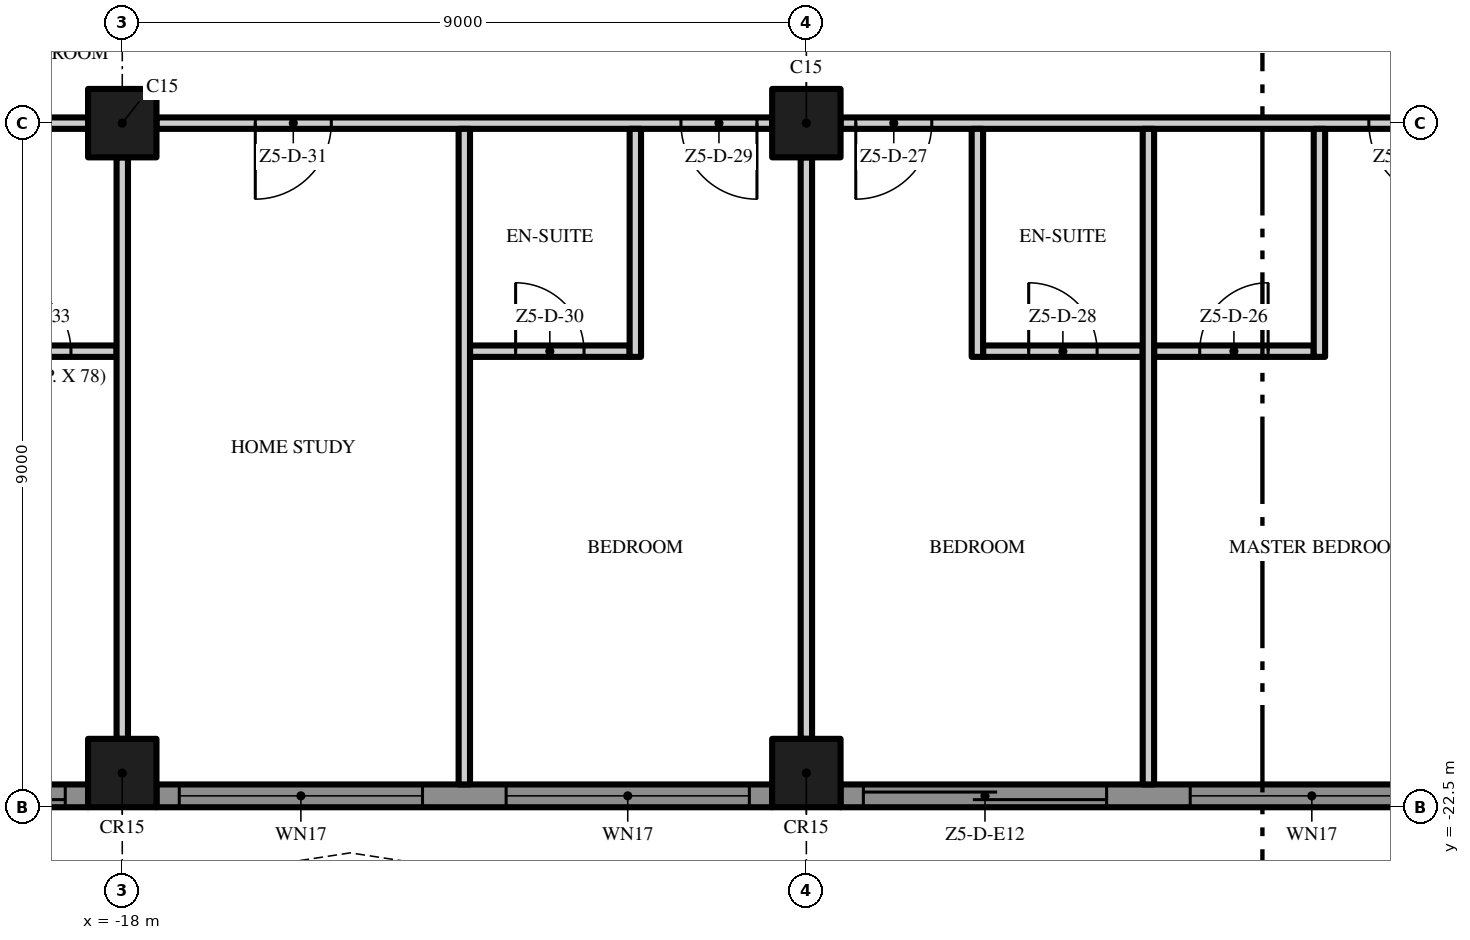
"""IFC4 building model, lengths in metres.
Left out: names, types, materials, properties, quantities, classifications, styles, units other than length and angle.
Written with IfcOpenShell. Run it as: python <this file> out.ifc"""

import sys

from ifc_helpers import new_model, si_unit, direction, frame, frame_2d, origin, origin_2d, place, context, subcontext, project, spatial, polyline, rectangle, outline, extrude, element, fill, save


model = new_model("IFC4")
c1 = context("Model", 3, precision=1e-05, world=origin(), true_north=direction((0.0, 1.0)))
c2 = subcontext(c1, "Body", "Model", "MODEL_VIEW")
j1 = project(units=[si_unit("LENGTHUNIT", "METRE"), si_unit("PLANEANGLEUNIT", "RADIAN")], contexts=[c1])
p1 = place(None, origin())
s1 = spatial("IfcSite", under=j1, at=p1, CompositionType="ELEMENT")
p2 = place(p1, origin())
s2 = spatial("IfcBuilding", under=s1, at=p2, CompositionType="ELEMENT")
p3 = place(p2, frame((0.0, 0.0, 280.6)))
s3 = spatial("IfcBuildingStorey", under=s2, at=p3, CompositionType="ELEMENT", Elevation=280.6)
for number, where, z_axis, x_axis in (
    (1, (-18.0, -13.5, 0.0), (0.0, 0.0, 1.0), (1.0, 0.0, 0.0)),
    (2, (-18.0, -22.05, 0.0), (0.0, 0.0, 1.0), (1.0, 0.0, 0.0)),
    (3, (-9.0, -13.5, 0.0), (0.0, 0.0, 1.0), (1.0, 0.0, 0.0)),
    (4, (-9.0, -22.05, 0.0), (0.0, 0.0, 1.0), (1.0, 0.0, 0.0)),
):
    element("IfcColumn", number, at=place(p3, frame(where, z_axis=z_axis, x_axis=x_axis)), inside=s3, PredefinedType="COLUMN", context=c2, shape_type="SweptSolid", body=[
        extrude(rectangle(XDim=0.9, YDim=0.9, at=origin_2d()), origin(), (0.0, 0.0, 1.0), 3.5),
    ])
p4 = place(p3, frame((-18.45, -22.35, 0.0), z_axis=(0.0, 0.0, 1.0), x_axis=(-1.0, 0.0, 0.0)))
e5 = element("IfcWall", 5, at=p4, inside=s3, PredefinedType="SOLIDWALL", context=c2, shape_type="SweptSolid", body=[
    extrude(rectangle(XDim=3.75, YDim=0.3, at=frame_2d((1.875, 0.0))), origin(), (0.0, 0.0, 1.0), 3.5),
])
p5 = place(p4, frame((0.3, 0.0, 0.0)))
e6 = element("IfcOpeningElement", 6, at=p5, cuts=e5, PredefinedType="OPENING", context=c2, shape_type="SweptSolid", body=[
    extrude(rectangle(XDim=3.15, YDim=2.4, at=frame_2d((1.575, 1.2))), frame((0.0, 0.16, 0.0), z_axis=(0.0, -1.0, 0.0), x_axis=(1.0, 0.0, 0.0)), (0.0, 0.0, 1.0), 0.32),
])
p6 = place(p3, frame((-9.45, -22.35, 0.0), z_axis=(0.0, 0.0, 1.0), x_axis=(-1.0, 0.0, 0.0)))
e7 = element("IfcWall", 7, at=p6, inside=s3, PredefinedType="SOLIDWALL", context=c2, shape_type="SweptSolid", body=[
    extrude(rectangle(XDim=8.1, YDim=0.3, at=frame_2d((4.05, 0.0))), origin(), (0.0, 0.0, 1.0), 3.5),
])
p7 = place(p6, frame((4.6, 0.0, 0.45)))
e8 = element("IfcOpeningElement", 8, at=p7, cuts=e7, PredefinedType="OPENING", context=c2, shape_type="SweptSolid", body=[
    extrude(rectangle(XDim=3.2, YDim=2.65, at=frame_2d((1.6, 1.325))), frame((0.0, 0.16, 0.0), z_axis=(0.0, -1.0, 0.0), x_axis=(1.0, 0.0, 0.0)), (0.0, 0.0, 1.0), 0.32),
])
p8 = place(p6, frame((0.3, 0.0, 0.45)))
e9 = element("IfcOpeningElement", 9, at=p8, cuts=e7, PredefinedType="OPENING", context=c2, shape_type="SweptSolid", body=[
    extrude(rectangle(XDim=3.2, YDim=2.65, at=frame_2d((1.6, 1.325))), frame((0.0, 0.16, 0.0), z_axis=(0.0, -1.0, 0.0), x_axis=(1.0, 0.0, 0.0)), (0.0, 0.0, 1.0), 0.32),
])
p9 = place(p3, frame((-0.45, -22.35, 0.0), z_axis=(0.0, 0.0, 1.0), x_axis=(-1.0, 0.0, 0.0)))
e10 = element("IfcWall", 10, at=p9, inside=s3, PredefinedType="SOLIDWALL", context=c2, shape_type="SweptSolid", body=[
    extrude(rectangle(XDim=8.1, YDim=0.3, at=frame_2d((4.05, 0.0))), origin(), (0.0, 0.0, 1.0), 3.5),
])
p10 = place(p9, frame((4.6, 0.0, 0.0)))
e11 = element("IfcOpeningElement", 11, at=p10, cuts=e10, PredefinedType="OPENING", context=c2, shape_type="SweptSolid", body=[
    extrude(rectangle(XDim=3.2, YDim=2.4, at=frame_2d((1.6, 1.2))), frame((0.0, 0.16, 0.0), z_axis=(0.0, -1.0, 0.0), x_axis=(1.0, 0.0, 0.0)), (0.0, 0.0, 1.0), 0.32),
])
p11 = place(p9, frame((0.3, 0.0, 0.45)))
e12 = element("IfcOpeningElement", 12, at=p11, cuts=e10, PredefinedType="OPENING", context=c2, shape_type="SweptSolid", body=[
    extrude(rectangle(XDim=3.2, YDim=2.65, at=frame_2d((1.6, 1.325))), frame((0.0, 0.16, 0.0), z_axis=(0.0, -1.0, 0.0), x_axis=(1.0, 0.0, 0.0)), (0.0, 0.0, 1.0), 0.32),
])
p12 = place(p3, origin())
e13 = element("IfcWall", 13, at=p12, inside=s3, PredefinedType="USERDEFINED", context=c2, shape_type="SweptSolid", body=[
    extrude(outline(polyline([(-22.5, -25.5), (-21.0, -25.271), (-19.5, -24.671), (-18.0, -23.929), (-16.5, -23.329), (-15.0, -23.1), (-13.5, -23.329), (-12.0, -23.929), (-10.5, -24.671), (-9.0, -25.271), (-7.5, -25.5), (-6.0, -25.271), (-4.5, -24.671), (-3.0, -23.929), (-1.5, -23.329), (0.0, -23.1), (1.5, -23.329), (3.0, -23.929), (4.5, -24.671), (6.0, -25.271), (7.5, -25.5), (9.0, -25.271), (10.5, -24.671), (12.0, -23.929), (13.5, -23.329), (15.0, -23.1), (16.5, -23.329), (18.0, -23.929), (19.5, -24.671), (21.0, -25.271), (22.5, -25.5), (22.538, -25.253), (21.066, -25.028), (19.602, -24.442), (18.102, -23.701), (16.566, -23.086), (15.0, -22.847), (13.434, -23.086), (11.898, -23.701), (10.398, -24.442), (8.934, -25.028), (7.5, -25.247), (6.066, -25.028), (4.602, -24.442), (3.102, -23.701), (1.566, -23.086), (0.0, -22.847), (-1.566, -23.086), (-3.102, -23.701), (-4.602, -24.442), (-6.066, -25.028), (-7.5, -25.247), (-8.934, -25.028), (-10.398, -24.442), (-11.898, -23.701), (-13.434, -23.086), (-15.0, -22.847), (-16.566, -23.086), (-18.102, -23.701), (-19.602, -24.442), (-21.066, -25.028), (-22.538, -25.253), (-22.5, -25.5)])), origin(), (0.0, 0.0, 1.0), 0.9),
])
p13 = place(p3, frame((-20.175, -16.5, 0.0), z_axis=(0.0, 0.0, 1.0), x_axis=(1.0, 0.0, 0.0)))
e14 = element("IfcWall", 14, at=p13, inside=s3, PredefinedType="PARTITIONING", context=c2, shape_type="SweptSolid", body=[
    extrude(rectangle(XDim=2.1, YDim=0.15, at=frame_2d((1.05, 0.0))), origin(), (0.0, 0.0, 1.0), 3.5),
])
p14 = place(p13, frame((0.6, 0.0, 0.0)))
e15 = element("IfcOpeningElement", 15, at=p14, cuts=e14, PredefinedType="OPENING", context=c2, shape_type="SweptSolid", body=[
    extrude(rectangle(XDim=0.9, YDim=2.1, at=frame_2d((0.45, 1.05))), frame((0.0, 0.085, 0.0), z_axis=(0.0, -1.0, 0.0), x_axis=(1.0, 0.0, 0.0)), (0.0, 0.0, 1.0), 0.17),
])
p15 = place(p3, frame((-13.425, -16.5, 0.0), z_axis=(0.0, 0.0, 1.0), x_axis=(1.0, 0.0, 0.0)))
e16 = element("IfcWall", 16, at=p15, inside=s3, PredefinedType="PARTITIONING", context=c2, shape_type="SweptSolid", body=[
    extrude(rectangle(XDim=2.1, YDim=0.15, at=frame_2d((1.05, 0.0))), origin(), (0.0, 0.0, 1.0), 3.5),
])
p16 = place(p15, frame((0.6, 0.0, 0.0)))
e17 = element("IfcOpeningElement", 17, at=p16, cuts=e16, PredefinedType="OPENING", context=c2, shape_type="SweptSolid", body=[
    extrude(rectangle(XDim=0.9, YDim=2.1, at=frame_2d((0.45, 1.05))), frame((0.0, 0.085, 0.0), z_axis=(0.0, -1.0, 0.0), x_axis=(1.0, 0.0, 0.0)), (0.0, 0.0, 1.0), 0.17),
])
p17 = place(p3, frame((-6.675, -16.5, 0.0), z_axis=(0.0, 0.0, 1.0), x_axis=(1.0, 0.0, 0.0)))
e18 = element("IfcWall", 18, at=p17, inside=s3, PredefinedType="PARTITIONING", context=c2, shape_type="SweptSolid", body=[
    extrude(rectangle(XDim=2.1, YDim=0.15, at=frame_2d((1.05, 0.0))), origin(), (0.0, 0.0, 1.0), 3.5),
])
p18 = place(p17, frame((0.6, 0.0, 0.0)))
e19 = element("IfcOpeningElement", 19, at=p18, cuts=e18, PredefinedType="OPENING", context=c2, shape_type="SweptSolid", body=[
    extrude(rectangle(XDim=0.9, YDim=2.1, at=frame_2d((0.45, 1.05))), frame((0.0, 0.085, 0.0), z_axis=(0.0, -1.0, 0.0), x_axis=(1.0, 0.0, 0.0)), (0.0, 0.0, 1.0), 0.17),
])
p19 = place(p3, frame((-4.425, -16.5, 0.0), z_axis=(0.0, 0.0, 1.0), x_axis=(1.0, 0.0, 0.0)))
e20 = element("IfcWall", 20, at=p19, inside=s3, PredefinedType="PARTITIONING", context=c2, shape_type="SweptSolid", body=[
    extrude(rectangle(XDim=2.1, YDim=0.15, at=frame_2d((1.05, 0.0))), origin(), (0.0, 0.0, 1.0), 3.5),
])
p20 = place(p19, frame((0.6, 0.0, 0.0)))
e21 = element("IfcOpeningElement", 21, at=p20, cuts=e20, PredefinedType="OPENING", context=c2, shape_type="SweptSolid", body=[
    extrude(rectangle(XDim=0.9, YDim=2.1, at=frame_2d((0.45, 1.05))), frame((0.0, 0.085, 0.0), z_axis=(0.0, -1.0, 0.0), x_axis=(1.0, 0.0, 0.0)), (0.0, 0.0, 1.0), 0.17),
])
p21 = place(p3, frame((-18.45, -13.5, 0.0), z_axis=(0.0, 0.0, 1.0), x_axis=(-1.0, 0.0, 0.0)))
e22 = element("IfcWall", 22, at=p21, inside=s3, PredefinedType="PARTITIONING", context=c2, shape_type="SweptSolid", body=[
    extrude(rectangle(XDim=7.65, YDim=0.15, at=frame_2d((3.825, 0.0))), origin(), (0.0, 0.0, 1.0), 3.5),
])
p22 = place(p21, frame((4.25, 0.0, 0.0)))
e23 = element("IfcOpeningElement", 23, at=p22, cuts=e22, PredefinedType="OPENING", context=c2, shape_type="SweptSolid", body=[
    extrude(rectangle(XDim=1.8, YDim=2.4, at=frame_2d((0.9, 1.2))), frame((0.0, 0.085, 0.0), z_axis=(0.0, -1.0, 0.0), x_axis=(1.0, 0.0, 0.0)), (0.0, 0.0, 1.0), 0.17),
])
p23 = place(p3, frame((-9.45, -13.5, 0.0), z_axis=(0.0, 0.0, 1.0), x_axis=(-1.0, 0.0, 0.0)))
e24 = element("IfcWall", 24, at=p23, inside=s3, PredefinedType="PARTITIONING", context=c2, shape_type="SweptSolid", body=[
    extrude(rectangle(XDim=8.1, YDim=0.15, at=frame_2d((4.05, 0.0))), origin(), (0.0, 0.0, 1.0), 3.5),
])
p24 = place(p23, frame((0.2, 0.0, 0.0)))
e25 = element("IfcOpeningElement", 25, at=p24, cuts=e24, PredefinedType="OPENING", context=c2, shape_type="SweptSolid", body=[
    extrude(rectangle(XDim=1.0, YDim=2.4, at=frame_2d((0.5, 1.2))), frame((0.0, 0.085, 0.0), z_axis=(0.0, -1.0, 0.0), x_axis=(1.0, 0.0, 0.0)), (0.0, 0.0, 1.0), 0.17),
])
p25 = place(p23, frame((5.8, 0.0, 0.0)))
e26 = element("IfcOpeningElement", 26, at=p25, cuts=e24, PredefinedType="OPENING", context=c2, shape_type="SweptSolid", body=[
    extrude(rectangle(XDim=1.0, YDim=2.4, at=frame_2d((0.5, 1.2))), frame((0.0, 0.085, 0.0), z_axis=(0.0, -1.0, 0.0), x_axis=(1.0, 0.0, 0.0)), (0.0, 0.0, 1.0), 0.17),
])
p26 = place(p3, frame((-0.45, -13.5, 0.0), z_axis=(0.0, 0.0, 1.0), x_axis=(-1.0, 0.0, 0.0)))
e27 = element("IfcWall", 27, at=p26, inside=s3, PredefinedType="PARTITIONING", context=c2, shape_type="SweptSolid", body=[
    extrude(rectangle(XDim=8.1, YDim=0.15, at=frame_2d((4.05, 0.0))), origin(), (0.0, 0.0, 1.0), 3.5),
])
p27 = place(p26, frame((0.15, 0.0, 0.0)))
e28 = element("IfcOpeningElement", 28, at=p27, cuts=e27, PredefinedType="OPENING", context=c2, shape_type="SweptSolid", body=[
    extrude(rectangle(XDim=1.0, YDim=2.4, at=frame_2d((0.5, 1.2))), frame((0.0, 0.085, 0.0), z_axis=(0.0, -1.0, 0.0), x_axis=(1.0, 0.0, 0.0)), (0.0, 0.0, 1.0), 0.17),
])
p28 = place(p26, frame((6.9, 0.0, 0.0)))
e29 = element("IfcOpeningElement", 29, at=p28, cuts=e27, PredefinedType="OPENING", context=c2, shape_type="SweptSolid", body=[
    extrude(rectangle(XDim=1.0, YDim=2.4, at=frame_2d((0.5, 1.2))), frame((0.0, 0.085, 0.0), z_axis=(0.0, -1.0, 0.0), x_axis=(1.0, 0.0, 0.0)), (0.0, 0.0, 1.0), 0.17),
])
p29 = place(p3, frame((-18.0, -21.6, 0.0), z_axis=(0.0, 0.0, 1.0), x_axis=(0.0, 1.0, 0.0)))
e30 = element("IfcWall", 30, at=p29, inside=s3, PredefinedType="PARTITIONING", context=c2, shape_type="SweptSolid", body=[
    extrude(rectangle(XDim=7.65, YDim=0.15, at=frame_2d((3.825, 0.0))), origin(), (0.0, 0.0, 1.0), 3.5),
])
p30 = place(p3, frame((-13.5, -22.2, 0.0), z_axis=(0.0, 0.0, 1.0), x_axis=(0.0, 1.0, 0.0)))
e31 = element("IfcWall", 31, at=p30, inside=s3, PredefinedType="PARTITIONING", context=c2, shape_type="SweptSolid", body=[
    extrude(rectangle(XDim=8.625, YDim=0.15, at=frame_2d((4.312, 0.0))), origin(), (0.0, 0.0, 1.0), 3.5),
])
p31 = place(p3, frame((-11.25, -16.575, 0.0), z_axis=(0.0, 0.0, 1.0), x_axis=(0.0, 1.0, 0.0)))
e32 = element("IfcWall", 32, at=p31, inside=s3, PredefinedType="PARTITIONING", context=c2, shape_type="SweptSolid", body=[
    extrude(rectangle(XDim=3.0, YDim=0.15, at=frame_2d((1.5, 0.0))), origin(), (0.0, 0.0, 1.0), 3.5),
])
p32 = place(p3, frame((-9.0, -21.6, 0.0), z_axis=(0.0, 0.0, 1.0), x_axis=(0.0, 1.0, 0.0)))
e33 = element("IfcWall", 33, at=p32, inside=s3, PredefinedType="PARTITIONING", context=c2, shape_type="SweptSolid", body=[
    extrude(rectangle(XDim=7.65, YDim=0.15, at=frame_2d((3.825, 0.0))), origin(), (0.0, 0.0, 1.0), 3.5),
])
p33 = place(p3, frame((-6.75, -16.575, 0.0), z_axis=(0.0, 0.0, 1.0), x_axis=(0.0, 1.0, 0.0)))
e34 = element("IfcWall", 34, at=p33, inside=s3, PredefinedType="PARTITIONING", context=c2, shape_type="SweptSolid", body=[
    extrude(rectangle(XDim=3.0, YDim=0.15, at=frame_2d((1.5, 0.0))), origin(), (0.0, 0.0, 1.0), 3.5),
])
p34 = place(p3, frame((-4.5, -22.2, 0.0), z_axis=(0.0, 0.0, 1.0), x_axis=(0.0, 1.0, 0.0)))
e35 = element("IfcWall", 35, at=p34, inside=s3, PredefinedType="PARTITIONING", context=c2, shape_type="SweptSolid", body=[
    extrude(rectangle(XDim=8.625, YDim=0.15, at=frame_2d((4.312, 0.0))), origin(), (0.0, 0.0, 1.0), 3.5),
])
p35 = place(p3, frame((-2.25, -16.575, 0.0), z_axis=(0.0, 0.0, 1.0), x_axis=(0.0, 1.0, 0.0)))
e36 = element("IfcWall", 36, at=p35, inside=s3, PredefinedType="PARTITIONING", context=c2, shape_type="SweptSolid", body=[
    extrude(rectangle(XDim=3.0, YDim=0.15, at=frame_2d((1.5, 0.0))), origin(), (0.0, 0.0, 1.0), 3.5),
])
p36 = place(p5, origin())
e37 = element("IfcDoor", 37, at=p36, inside=s3, OperationType="SINGLE_SWING_LEFT", PredefinedType="DOOR", context=c2, shape_type="SweptSolid", body=[
    extrude(rectangle(XDim=3.15, YDim=2.4, at=frame_2d((1.575, 1.2))), frame((0.0, 0.025, 0.0), z_axis=(0.0, -1.0, 0.0), x_axis=(1.0, 0.0, 0.0)), (0.0, 0.0, 1.0), 0.05),
])
fill(e6, e37)
p37 = place(p7, origin())
e38 = element("IfcWindow", 38, at=p37, inside=s3, PartitioningType="SINGLE_PANEL", PredefinedType="WINDOW", context=c2, shape_type="SweptSolid", body=[
    extrude(rectangle(XDim=3.2, YDim=2.65, at=frame_2d((1.6, 1.325))), frame((0.0, 0.03, 0.0), z_axis=(0.0, -1.0, 0.0), x_axis=(1.0, 0.0, 0.0)), (0.0, 0.0, 1.0), 0.06),
])
fill(e8, e38)
p38 = place(p8, origin())
e39 = element("IfcWindow", 39, at=p38, inside=s3, PartitioningType="SINGLE_PANEL", PredefinedType="WINDOW", context=c2, shape_type="SweptSolid", body=[
    extrude(rectangle(XDim=3.2, YDim=2.65, at=frame_2d((1.6, 1.325))), frame((0.0, 0.03, 0.0), z_axis=(0.0, -1.0, 0.0), x_axis=(1.0, 0.0, 0.0)), (0.0, 0.0, 1.0), 0.06),
])
fill(e9, e39)
p39 = place(p10, origin())
e40 = element("IfcDoor", 40, at=p39, inside=s3, OperationType="SINGLE_SWING_LEFT", PredefinedType="DOOR", context=c2, shape_type="SweptSolid", body=[
    extrude(rectangle(XDim=3.2, YDim=2.4, at=frame_2d((1.6, 1.2))), frame((0.0, 0.025, 0.0), z_axis=(0.0, -1.0, 0.0), x_axis=(1.0, 0.0, 0.0)), (0.0, 0.0, 1.0), 0.05),
])
fill(e11, e40)
p40 = place(p11, origin())
e41 = element("IfcWindow", 41, at=p40, inside=s3, PartitioningType="SINGLE_PANEL", PredefinedType="WINDOW", context=c2, shape_type="SweptSolid", body=[
    extrude(rectangle(XDim=3.2, YDim=2.65, at=frame_2d((1.6, 1.325))), frame((0.0, 0.03, 0.0), z_axis=(0.0, -1.0, 0.0), x_axis=(1.0, 0.0, 0.0)), (0.0, 0.0, 1.0), 0.06),
])
fill(e12, e41)
p41 = place(p27, origin())
e42 = element("IfcDoor", 42, at=p41, inside=s3, OperationType="SINGLE_SWING_LEFT", PredefinedType="DOOR", context=c2, shape_type="SweptSolid", body=[
    extrude(rectangle(XDim=1.0, YDim=2.4, at=frame_2d((0.5, 1.2))), frame((0.0, 0.025, 0.0), z_axis=(0.0, -1.0, 0.0), x_axis=(1.0, 0.0, 0.0)), (0.0, 0.0, 1.0), 0.05),
])
fill(e28, e42)
p42 = place(p20, origin())
e43 = element("IfcDoor", 43, at=p42, inside=s3, OperationType="SINGLE_SWING_RIGHT", PredefinedType="DOOR", context=c2, shape_type="SweptSolid", body=[
    extrude(rectangle(XDim=0.9, YDim=2.1, at=frame_2d((0.45, 1.05))), frame((0.0, 0.025, 0.0), z_axis=(0.0, -1.0, 0.0), x_axis=(1.0, 0.0, 0.0)), (0.0, 0.0, 1.0), 0.05),
])
fill(e21, e43)
p43 = place(p28, origin())
e44 = element("IfcDoor", 44, at=p43, inside=s3, OperationType="SINGLE_SWING_RIGHT", PredefinedType="DOOR", context=c2, shape_type="SweptSolid", body=[
    extrude(rectangle(XDim=1.0, YDim=2.4, at=frame_2d((0.5, 1.2))), frame((0.0, 0.025, 0.0), z_axis=(0.0, -1.0, 0.0), x_axis=(1.0, 0.0, 0.0)), (0.0, 0.0, 1.0), 0.05),
])
fill(e29, e44)
p44 = place(p18, origin())
e45 = element("IfcDoor", 45, at=p44, inside=s3, OperationType="SINGLE_SWING_LEFT", PredefinedType="DOOR", context=c2, shape_type="SweptSolid", body=[
    extrude(rectangle(XDim=0.9, YDim=2.1, at=frame_2d((0.45, 1.05))), frame((0.0, 0.025, 0.0), z_axis=(0.0, -1.0, 0.0), x_axis=(1.0, 0.0, 0.0)), (0.0, 0.0, 1.0), 0.05),
])
fill(e19, e45)
p45 = place(p24, origin())
e46 = element("IfcDoor", 46, at=p45, inside=s3, OperationType="SINGLE_SWING_LEFT", PredefinedType="DOOR", context=c2, shape_type="SweptSolid", body=[
    extrude(rectangle(XDim=1.0, YDim=2.4, at=frame_2d((0.5, 1.2))), frame((0.0, 0.025, 0.0), z_axis=(0.0, -1.0, 0.0), x_axis=(1.0, 0.0, 0.0)), (0.0, 0.0, 1.0), 0.05),
])
fill(e25, e46)
p46 = place(p16, origin())
e47 = element("IfcDoor", 47, at=p46, inside=s3, OperationType="SINGLE_SWING_LEFT", PredefinedType="DOOR", context=c2, shape_type="SweptSolid", body=[
    extrude(rectangle(XDim=0.9, YDim=2.1, at=frame_2d((0.45, 1.05))), frame((0.0, 0.025, 0.0), z_axis=(0.0, -1.0, 0.0), x_axis=(1.0, 0.0, 0.0)), (0.0, 0.0, 1.0), 0.05),
])
fill(e17, e47)
p47 = place(p25, origin())
e48 = element("IfcDoor", 48, at=p47, inside=s3, OperationType="SINGLE_SWING_RIGHT", PredefinedType="DOOR", context=c2, shape_type="SweptSolid", body=[
    extrude(rectangle(XDim=1.0, YDim=2.4, at=frame_2d((0.5, 1.2))), frame((0.0, 0.025, 0.0), z_axis=(0.0, -1.0, 0.0), x_axis=(1.0, 0.0, 0.0)), (0.0, 0.0, 1.0), 0.05),
])
fill(e26, e48)
p48 = place(p14, origin())
e49 = element("IfcDoor", 49, at=p48, inside=s3, OperationType="SINGLE_SWING_LEFT", PredefinedType="DOOR", context=c2, shape_type="SweptSolid", body=[
    extrude(rectangle(XDim=0.9, YDim=2.1, at=frame_2d((0.45, 1.05))), frame((0.0, 0.025, 0.0), z_axis=(0.0, -1.0, 0.0), x_axis=(1.0, 0.0, 0.0)), (0.0, 0.0, 1.0), 0.05),
])
fill(e15, e49)
save(model, sys.argv[1])
